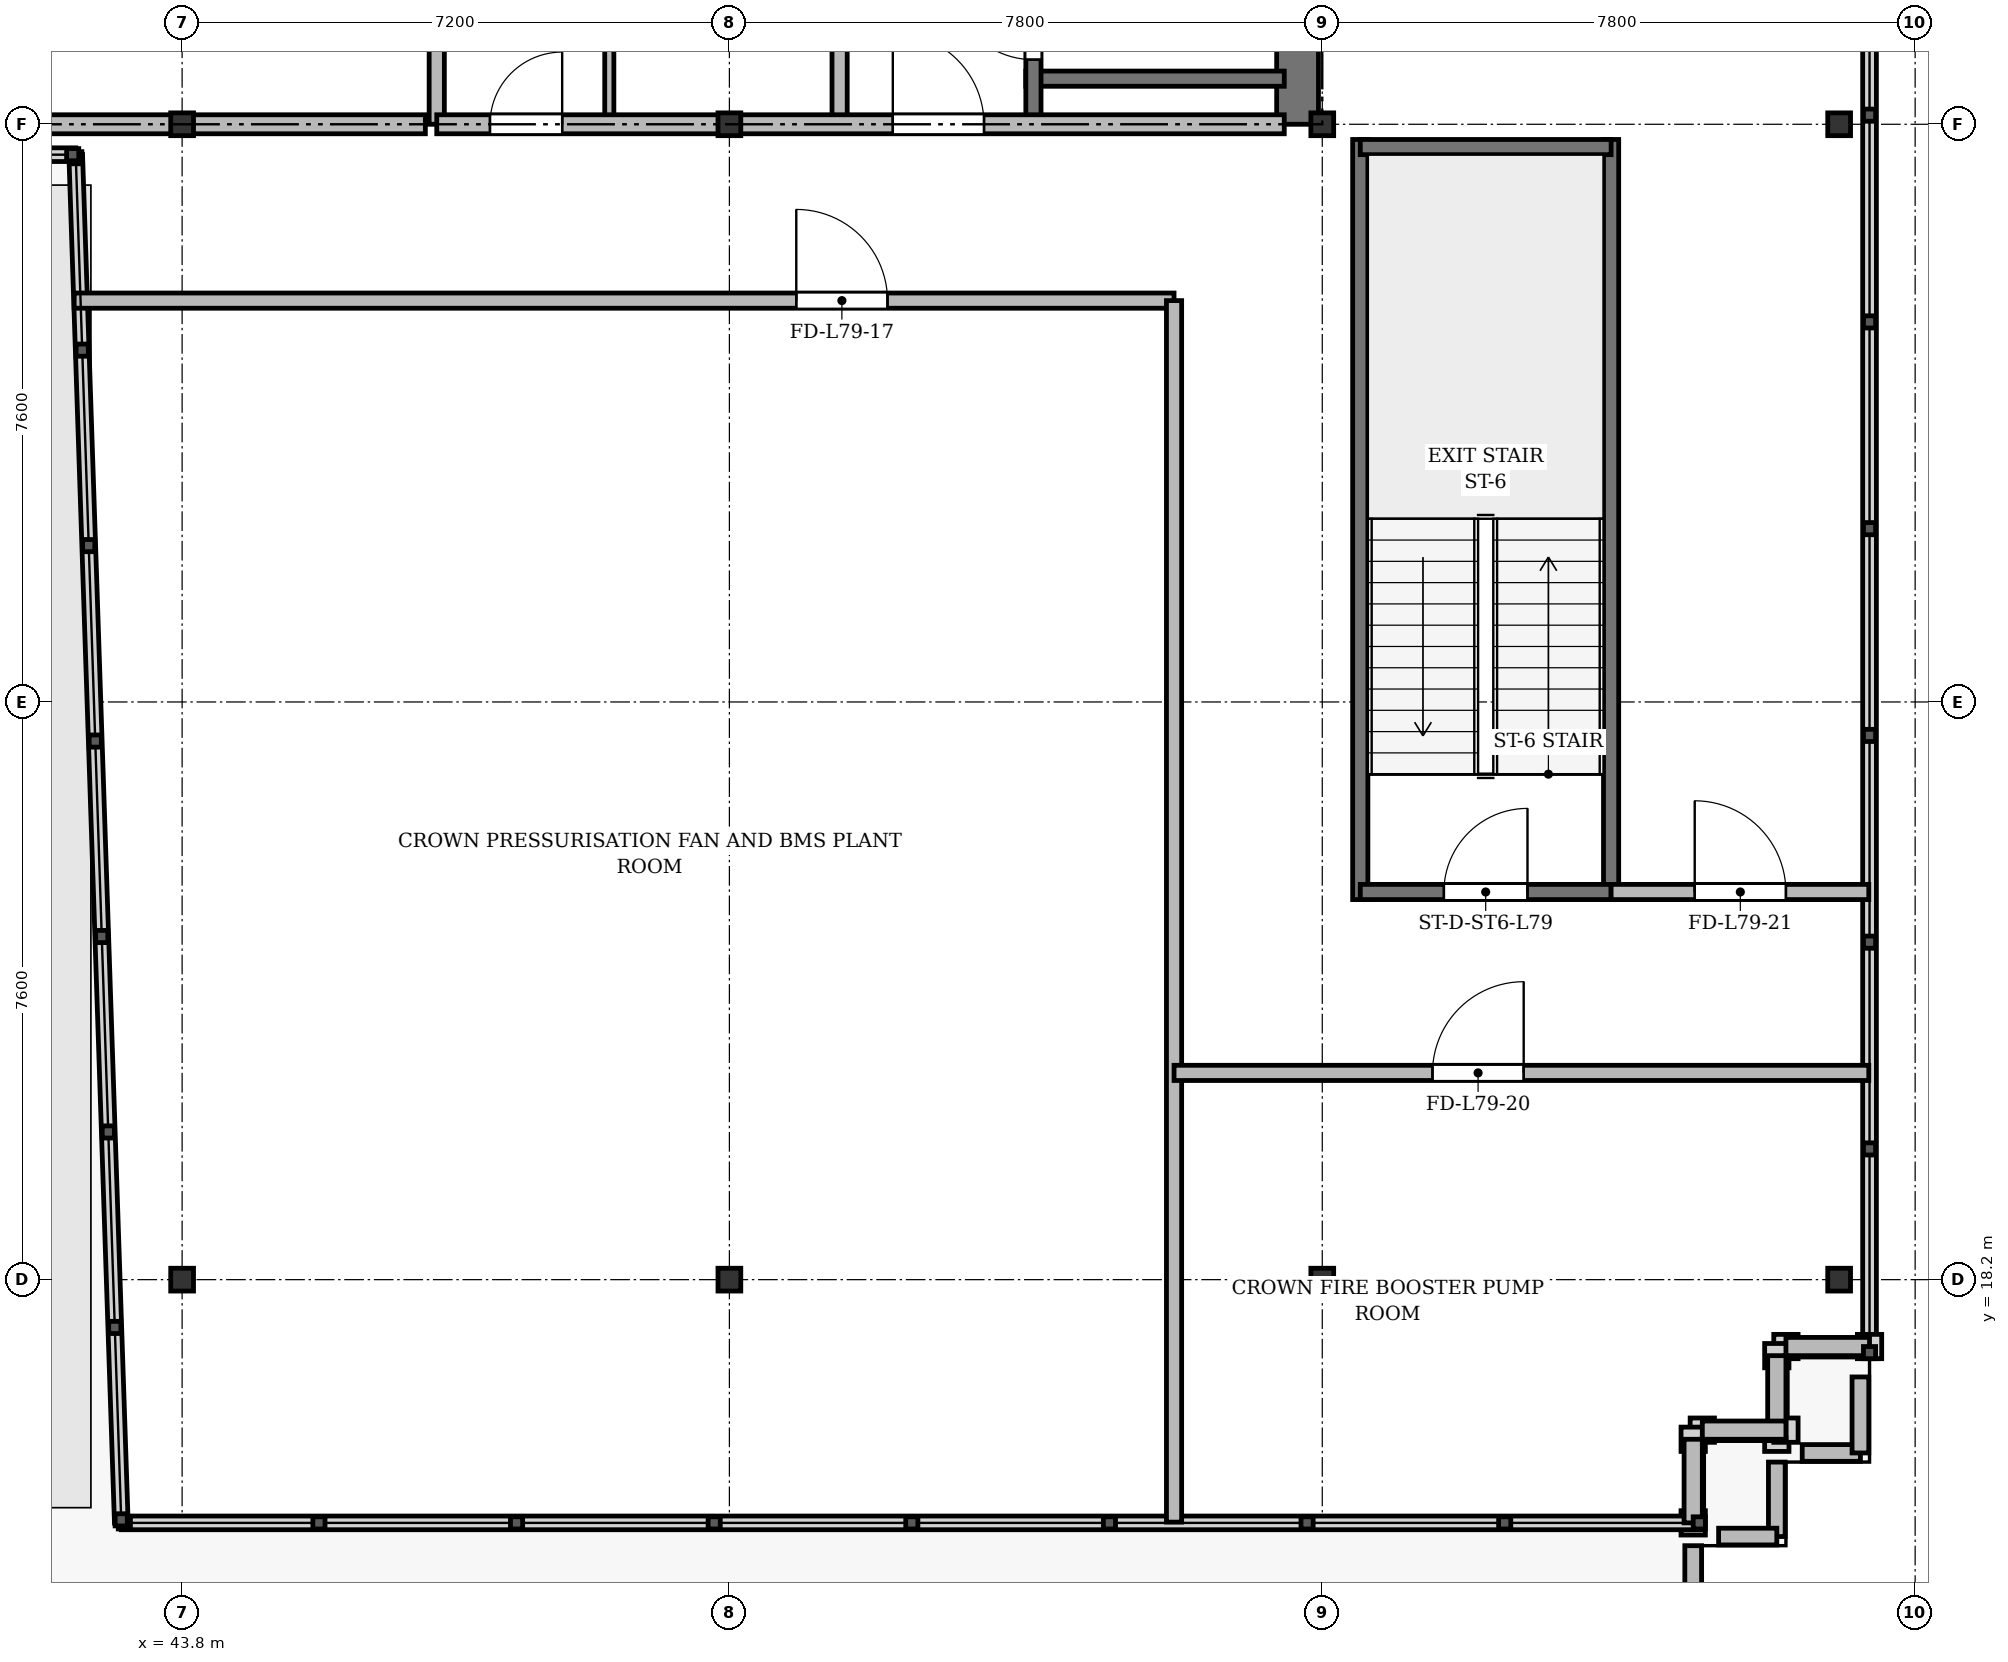
"""IFC4 building model, lengths in metres.
Left out: names, types, materials, properties, quantities, classifications, styles, units other than length and angle.
Written with IfcOpenShell. Run it as: python <this file> out.ifc"""

import sys

from ifc_helpers import new_model, si_unit, direction, frame, frame_2d, origin, origin_2d, place, context, subcontext, project, spatial, rectangle, i_section, extrude, source, transform, mapped, element, fill, save


model = new_model("IFC4")
c1 = context("Model", 3, precision=1e-05, world=origin(), true_north=direction((0.0, 1.0)))
c2 = subcontext(c1, "Body", "Model", "MODEL_VIEW")
j1 = project(units=[si_unit("LENGTHUNIT", "METRE"), si_unit("PLANEANGLEUNIT", "RADIAN")], contexts=[c1])
p1 = place(None, origin())
s1 = spatial("IfcSite", under=j1, at=p1, CompositionType="ELEMENT")
p2 = place(p1, origin())
s2 = spatial("IfcBuilding", under=s1, at=p2, CompositionType="ELEMENT")
p3 = place(p2, frame((0.0, 0.0, 303.5)))
s3 = spatial("IfcBuildingStorey", under=s2, at=p3, CompositionType="ELEMENT", Elevation=303.5)
m1 = source(origin(), c2, "Body", "SweptSolid", [
    extrude(i_section(OverallWidth=0.3, OverallDepth=0.3, WebThickness=0.015, FlangeThickness=0.024, at=origin_2d()), origin(), (0.0, 0.0, 1.0), 4.4),
])
for number, where, z_axis, x_axis in (
    (1, (43.8, 18.2, 0.0), (0.0, 0.0, 1.0), (1.0, 0.0, 0.0)),
    (2, (43.8, 33.4, 0.0), (0.0, 0.0, 1.0), (1.0, 0.0, 0.0)),
    (3, (51.0, 18.2, 0.0), (0.0, 0.0, 1.0), (1.0, 0.0, 0.0)),
    (4, (51.0, 33.4, 0.0), (0.0, 0.0, 1.0), (1.0, 0.0, 0.0)),
    (5, (58.8, 18.2, 0.0), (0.0, 0.0, 1.0), (1.0, 0.0, 0.0)),
    (6, (58.8, 33.4, 0.0), (0.0, 0.0, 1.0), (1.0, 0.0, 0.0)),
    (7, (65.6, 18.2, 0.0), (0.0, 0.0, 1.0), (1.0, 0.0, 0.0)),
    (8, (65.6, 33.4, 0.0), (0.0, 0.0, 1.0), (1.0, 0.0, 0.0)),
):
    element("IfcColumn", number, at=place(p3, frame(where, z_axis=z_axis, x_axis=x_axis)), inside=s3, PredefinedType="COLUMN", context=c2, shape_type="MappedRepresentation", body=[
        mapped(m1, transform((0.0, 0.0, 0.0), x_axis=(1.0, 0.0, 0.0), y_axis=(0.0, 1.0, 0.0), z_axis=(0.0, 0.0, 1.0), scale=1.0)),
    ])
p4 = place(p3, frame((66.0, 17.32, 0.0), z_axis=(0.0, 0.0, 1.0), x_axis=(-1.0, 0.0, 0.0)))
e9 = element("IfcWall", 9, at=p4, inside=s3, PredefinedType="SOLIDWALL", context=c2, shape_type="SweptSolid", body=[
    extrude(rectangle(XDim=1.1, YDim=0.24, at=frame_2d((0.55, 0.0))), origin(), (0.0, 0.0, 1.0), 4.1),
])
for number, where, z_axis, x_axis in (
    (10, (64.78, 17.2, 0.0), (0.0, 0.0, 1.0), (0.0, -1.0, 0.0)),
    (11, (64.9, 16.22, 0.0), (0.0, 0.0, 1.0), (-1.0, 0.0, 0.0)),
):
    element("IfcWall", number, at=place(p3, frame(where, z_axis=z_axis, x_axis=x_axis)), inside=s3, PredefinedType="SOLIDWALL", context=c2, shape_type="SweptSolid", body=[
        extrude(rectangle(XDim=1.1, YDim=0.24, at=frame_2d((0.55, 0.0))), origin(), (0.0, 0.0, 1.0), 4.1),
    ])
p5 = place(p3, frame((63.68, 16.1, 0.0), z_axis=(0.0, 0.0, 1.0), x_axis=(0.0, -1.0, 0.0)))
e12 = element("IfcWall", 12, at=p5, inside=s3, PredefinedType="SOLIDWALL", context=c2, shape_type="SweptSolid", body=[
    extrude(rectangle(XDim=1.1, YDim=0.24, at=frame_2d((0.55, 0.0))), origin(), (0.0, 0.0, 1.0), 4.1),
])
p6 = place(p3, frame((65.88, 15.92, 0.0), z_axis=(0.0, 0.0, 1.0), x_axis=(-1.0, 0.0, 0.0)))
e13 = element("IfcWall", 13, at=p6, inside=s3, PredefinedType="PARAPET", context=c2, shape_type="SweptSolid", body=[
    extrude(rectangle(XDim=0.766, YDim=0.22, at=frame_2d((0.383, 0.0))), origin(), (0.0, 0.0, 1.0), 1.08),
])
p7 = place(p3, frame((64.78, 15.8, 0.0), z_axis=(0.0, 0.0, 1.0), x_axis=(0.0, -1.0, 0.0)))
e14 = element("IfcWall", 14, at=p7, inside=s3, PredefinedType="PARAPET", context=c2, shape_type="SweptSolid", body=[
    extrude(rectangle(XDim=0.98, YDim=0.22, at=frame_2d((0.49, 0.0))), origin(), (0.0, 0.0, 1.0), 1.08),
])
p8 = place(p3, frame((64.78, 14.82, 0.0), z_axis=(0.0, 0.0, 1.0), x_axis=(-1.0, 0.0, 0.0)))
e15 = element("IfcWall", 15, at=p8, inside=s3, PredefinedType="PARAPET", context=c2, shape_type="SweptSolid", body=[
    extrude(rectangle(XDim=0.766, YDim=0.22, at=frame_2d((0.383, 0.0))), origin(), (0.0, 0.0, 1.0), 1.08),
])
p9 = place(p3, frame((63.68, 14.7, 0.0), z_axis=(0.0, 0.0, 1.0), x_axis=(0.0, -1.0, 0.0)))
e16 = element("IfcWall", 16, at=p9, inside=s3, PredefinedType="PARAPET", context=c2, shape_type="SweptSolid", body=[
    extrude(rectangle(XDim=0.98, YDim=0.22, at=frame_2d((0.49, 0.0))), origin(), (0.0, 0.0, 1.0), 1.08),
])
p10 = place(p3, frame((65.88, 16.92, 0.0), z_axis=(0.0, 0.0, 1.0), x_axis=(0.0, -1.0, 0.0)))
e17 = element("IfcWall", 17, at=p10, inside=s3, PredefinedType="PARAPET", context=c2, shape_type="SweptSolid", body=[
    extrude(rectangle(XDim=1.0, YDim=0.22, at=frame_2d((0.5, 0.0))), origin(), (0.0, 0.0, 1.0), 1.08),
])
p11 = place(p3, frame((58.475, 33.4, 0.0), z_axis=(0.0, 0.0, 1.0), x_axis=(0.0, 1.0, 0.0)))
e18 = element("IfcWall", 18, at=p11, inside=s3, PredefinedType="SHEAR", context=c2, shape_type="SweptSolid", body=[
    extrude(rectangle(XDim=11.55, YDim=0.55, at=frame_2d((5.775, 0.0))), origin(), (0.0, 0.0, 1.0), 4.1),
])
p12 = place(p3, frame((54.9, 34.0, 0.0), z_axis=(0.0, 0.0, 1.0), x_axis=(1.0, 0.0, 0.0)))
e19 = element("IfcWall", 19, at=p12, inside=s3, PredefinedType="SHEAR", context=c2, shape_type="SweptSolid", body=[
    extrude(rectangle(XDim=3.4, YDim=0.2, at=frame_2d((1.7, 0.0))), origin(), (0.0, 0.0, 1.0), 4.1),
])
p13 = place(p3, frame((55.0, 33.4, 0.0), z_axis=(0.0, 0.0, 1.0), x_axis=(0.0, 1.0, 0.0)))
e20 = element("IfcWall", 20, at=p13, inside=s3, PredefinedType="SHEAR", context=c2, shape_type="SweptSolid", body=[
    extrude(rectangle(XDim=11.1, YDim=0.2, at=frame_2d((5.55, 0.0))), origin(), (0.0, 0.0, 1.0), 4.1),
])
p14 = place(p13, frame((0.85, 0.0, 0.0)))
e21 = element("IfcOpeningElement", 21, at=p14, cuts=e20, PredefinedType="OPENING", context=c2, shape_type="SweptSolid", body=[
    extrude(rectangle(XDim=1.1, YDim=2.15, at=frame_2d((0.55, 1.075))), frame((0.0, 0.11, 0.0), z_axis=(0.0, -1.0, 0.0), x_axis=(1.0, 0.0, 0.0)), (0.0, 0.0, 1.0), 0.22),
])
for number, where, z_axis, x_axis in (
    (22, (59.3, 23.2, 0.0), (0.0, 0.0, 1.0), (0.0, 1.0, 0.0)),
    (23, (62.6, 23.2, 0.0), (0.0, 0.0, 1.0), (0.0, 1.0, 0.0)),
):
    element("IfcWall", number, at=place(p3, frame(where, z_axis=z_axis, x_axis=x_axis)), inside=s3, PredefinedType="SHEAR", context=c2, shape_type="SweptSolid", body=[
        extrude(rectangle(XDim=10.0, YDim=0.2, at=frame_2d((5.0, 0.0))), origin(), (0.0, 0.0, 1.0), 4.1),
    ])
p15 = place(p3, frame((59.3, 33.1, 0.0), z_axis=(0.0, 0.0, 1.0), x_axis=(1.0, 0.0, 0.0)))
e24 = element("IfcWall", 24, at=p15, inside=s3, PredefinedType="SHEAR", context=c2, shape_type="SweptSolid", body=[
    extrude(rectangle(XDim=3.3, YDim=0.2, at=frame_2d((1.65, 0.0))), origin(), (0.0, 0.0, 1.0), 4.1),
])
p16 = place(p3, frame((59.3, 23.3, 0.0), z_axis=(0.0, 0.0, 1.0), x_axis=(1.0, 0.0, 0.0)))
e25 = element("IfcWall", 25, at=p16, inside=s3, PredefinedType="SHEAR", context=c2, shape_type="SweptSolid", body=[
    extrude(rectangle(XDim=3.3, YDim=0.2, at=frame_2d((1.65, 0.0))), origin(), (0.0, 0.0, 1.0), 4.1),
])
p17 = place(p16, frame((1.1, 0.0, 0.0)))
e26 = element("IfcOpeningElement", 26, at=p17, cuts=e25, PredefinedType="OPENING", context=c2, shape_type="SweptSolid", body=[
    extrude(rectangle(XDim=1.1, YDim=2.15, at=frame_2d((0.55, 1.075))), frame((0.0, 0.11, 0.0), z_axis=(0.0, -1.0, 0.0), x_axis=(1.0, 0.0, 0.0)), (0.0, 0.0, 1.0), 0.22),
])
p18 = place(p3, frame((26.3, 33.4, 0.0), z_axis=(0.0, 0.0, 1.0), x_axis=(1.0, 0.0, 0.0)))
e27 = element("IfcWall", 27, at=p18, inside=s3, PredefinedType="PARTITIONING", context=c2, shape_type="SweptSolid", body=[
    extrude(rectangle(XDim=20.7, YDim=0.25, at=frame_2d((10.35, 0.0))), origin(), (0.0, 0.0, 1.0), 3.6),
])
p19 = place(p18, frame((2.0, 0.0, 0.0)))
e28 = element("IfcOpeningElement", 28, at=p19, cuts=e27, PredefinedType="OPENING", context=c2, shape_type="SweptSolid", body=[
    extrude(rectangle(XDim=1.6, YDim=2.2, at=frame_2d((0.8, 1.1))), frame((0.0, 0.135, 0.0), z_axis=(0.0, -1.0, 0.0), x_axis=(1.0, 0.0, 0.0)), (0.0, 0.0, 1.0), 0.27),
])
p20 = place(p3, frame((47.15, 33.4, 0.0), z_axis=(0.0, 0.0, 1.0), x_axis=(0.0, 1.0, 0.0)))
e29 = element("IfcWall", 29, at=p20, inside=s3, PredefinedType="SOLIDWALL", context=c2, shape_type="SweptSolid", body=[
    extrude(rectangle(XDim=11.3, YDim=0.2, at=frame_2d((5.65, 0.0))), origin(), (0.0, 0.0, 1.0), 3.6),
])
p21 = place(p3, frame((52.45, 33.4, 0.0), z_axis=(0.0, 0.0, 1.0), x_axis=(0.0, 1.0, 0.0)))
e30 = element("IfcWall", 30, at=p21, inside=s3, PredefinedType="PARTITIONING", context=c2, shape_type="SweptSolid", body=[
    extrude(rectangle(XDim=8.65, YDim=0.2, at=frame_2d((4.325, 0.0))), origin(), (0.0, 0.0, 1.0), 3.6),
])
p22 = place(p21, frame((6.2, 0.0, 0.0)))
e31 = element("IfcOpeningElement", 31, at=p22, cuts=e30, PredefinedType="OPENING", context=c2, shape_type="SweptSolid", body=[
    extrude(rectangle(XDim=0.95, YDim=2.15, at=frame_2d((0.475, 1.075))), frame((0.0, 0.11, 0.0), z_axis=(0.0, -1.0, 0.0), x_axis=(1.0, 0.0, 0.0)), (0.0, 0.0, 1.0), 0.22),
])
p23 = place(p3, frame((49.42, 33.4, 0.0), z_axis=(0.0, 0.0, 1.0), x_axis=(0.0, 1.0, 0.0)))
e32 = element("IfcWall", 32, at=p23, inside=s3, PredefinedType="PARTITIONING", context=c2, shape_type="SweptSolid", body=[
    extrude(rectangle(XDim=8.6, YDim=0.12, at=frame_2d((4.3, 0.0))), origin(), (0.0, 0.0, 1.0), 3.6),
])
p24 = place(p23, frame((1.3, 0.0, 0.0)))
e33 = element("IfcOpeningElement", 33, at=p24, cuts=e32, PredefinedType="OPENING", context=c2, shape_type="SweptSolid", body=[
    extrude(rectangle(XDim=0.95, YDim=2.15, at=frame_2d((0.475, 1.075))), frame((0.0, 0.07, 0.0), z_axis=(0.0, -1.0, 0.0), x_axis=(1.0, 0.0, 0.0)), (0.0, 0.0, 1.0), 0.14),
])
p25 = place(p23, frame((5.5, 0.0, 0.0)))
e34 = element("IfcOpeningElement", 34, at=p25, cuts=e32, PredefinedType="OPENING", context=c2, shape_type="SweptSolid", body=[
    extrude(rectangle(XDim=0.95, YDim=2.15, at=frame_2d((0.475, 1.075))), frame((0.0, 0.07, 0.0), z_axis=(0.0, -1.0, 0.0), x_axis=(1.0, 0.0, 0.0)), (0.0, 0.0, 1.0), 0.14),
])
p26 = place(p3, frame((47.15, 33.4, 0.0), z_axis=(0.0, 0.0, 1.0), x_axis=(1.0, 0.0, 0.0)))
e35 = element("IfcWall", 35, at=p26, inside=s3, PredefinedType="PARTITIONING", context=c2, shape_type="SweptSolid", body=[
    extrude(rectangle(XDim=11.15, YDim=0.25, at=frame_2d((5.575, 0.0))), origin(), (0.0, 0.0, 1.0), 3.6),
])
p27 = place(p26, frame((0.7, 0.0, 0.0)))
e36 = element("IfcOpeningElement", 36, at=p27, cuts=e35, PredefinedType="OPENING", context=c2, shape_type="SweptSolid", body=[
    extrude(rectangle(XDim=0.95, YDim=2.15, at=frame_2d((0.475, 1.075))), frame((0.0, 0.135, 0.0), z_axis=(0.0, -1.0, 0.0), x_axis=(1.0, 0.0, 0.0)), (0.0, 0.0, 1.0), 0.27),
])
p28 = place(p26, frame((6.0, 0.0, 0.0)))
e37 = element("IfcOpeningElement", 37, at=p28, cuts=e35, PredefinedType="OPENING", context=c2, shape_type="SweptSolid", body=[
    extrude(rectangle(XDim=1.2, YDim=2.15, at=frame_2d((0.6, 1.075))), frame((0.0, 0.135, 0.0), z_axis=(0.0, -1.0, 0.0), x_axis=(1.0, 0.0, 0.0)), (0.0, 0.0, 1.0), 0.27),
])
p29 = place(p3, frame((42.38, 31.08, 0.0), z_axis=(0.0, 0.0, 1.0), x_axis=(1.0, 0.0, 0.0)))
e38 = element("IfcWall", 38, at=p29, inside=s3, PredefinedType="PARTITIONING", context=c2, shape_type="SweptSolid", body=[
    extrude(rectangle(XDim=14.47, YDim=0.2, at=frame_2d((7.235, 0.0))), origin(), (0.0, 0.0, 1.0), 3.6),
])
p30 = place(p29, frame((9.5, 0.0, 0.0)))
e39 = element("IfcOpeningElement", 39, at=p30, cuts=e38, PredefinedType="OPENING", context=c2, shape_type="SweptSolid", body=[
    extrude(rectangle(XDim=1.2, YDim=2.15, at=frame_2d((0.6, 1.075))), frame((0.0, 0.11, 0.0), z_axis=(0.0, -1.0, 0.0), x_axis=(1.0, 0.0, 0.0)), (0.0, 0.0, 1.0), 0.22),
])
p31 = place(p3, frame((56.85, 15.01, 0.0), z_axis=(0.0, 0.0, 1.0), x_axis=(0.0, 1.0, 0.0)))
e40 = element("IfcWall", 40, at=p31, inside=s3, PredefinedType="PARTITIONING", context=c2, shape_type="SweptSolid", body=[
    extrude(rectangle(XDim=16.07, YDim=0.2, at=frame_2d((8.035, 0.0))), origin(), (0.0, 0.0, 1.0), 3.6),
])
p32 = place(p3, frame((56.85, 20.92, 0.0), z_axis=(0.0, 0.0, 1.0), x_axis=(1.0, 0.0, 0.0)))
e41 = element("IfcWall", 41, at=p32, inside=s3, PredefinedType="PARTITIONING", context=c2, shape_type="SweptSolid", body=[
    extrude(rectangle(XDim=9.14, YDim=0.2, at=frame_2d((4.57, 0.0))), origin(), (0.0, 0.0, 1.0), 3.6),
])
p33 = place(p32, frame((3.4, 0.0, 0.0)))
e42 = element("IfcOpeningElement", 42, at=p33, cuts=e41, PredefinedType="OPENING", context=c2, shape_type="SweptSolid", body=[
    extrude(rectangle(XDim=1.2, YDim=2.15, at=frame_2d((0.6, 1.075))), frame((0.0, 0.11, 0.0), z_axis=(0.0, -1.0, 0.0), x_axis=(1.0, 0.0, 0.0)), (0.0, 0.0, 1.0), 0.22),
])
p34 = place(p3, frame((62.6, 23.3, 0.0), z_axis=(0.0, 0.0, 1.0), x_axis=(1.0, 0.0, 0.0)))
e43 = element("IfcWall", 43, at=p34, inside=s3, PredefinedType="PARTITIONING", context=c2, shape_type="SweptSolid", body=[
    extrude(rectangle(XDim=3.39, YDim=0.2, at=frame_2d((1.695, 0.0))), origin(), (0.0, 0.0, 1.0), 3.6),
])
p35 = place(p34, frame((1.1, 0.0, 0.0)))
e44 = element("IfcOpeningElement", 44, at=p35, cuts=e43, PredefinedType="OPENING", context=c2, shape_type="SweptSolid", body=[
    extrude(rectangle(XDim=1.2, YDim=2.15, at=frame_2d((0.6, 1.075))), frame((0.0, 0.11, 0.0), z_axis=(0.0, -1.0, 0.0), x_axis=(1.0, 0.0, 0.0)), (0.0, 0.0, 1.0), 0.22),
])
m2 = source(origin(), c2, "Body", "SweptSolid", [
    extrude(rectangle(XDim=1.1, YDim=2.15, at=frame_2d((0.55, 1.075))), frame((0.0, 0.025, 0.0), z_axis=(0.0, -1.0, 0.0), x_axis=(1.0, 0.0, 0.0)), (0.0, 0.0, 1.0), 0.05),
])
p36 = place(p14, origin())
e45 = element("IfcDoor", 45, at=p36, inside=s3, OperationType="SINGLE_SWING_RIGHT", PredefinedType="DOOR", context=c2, shape_type="MappedRepresentation", body=[
    mapped(m2, transform((0.0, 0.0, 0.0), x_axis=(1.0, 0.0, 0.0), y_axis=(0.0, 1.0, 0.0), z_axis=(0.0, 0.0, 1.0), scale=1.0)),
])
fill(e21, e45)
p37 = place(p17, origin())
e46 = element("IfcDoor", 46, at=p37, inside=s3, OperationType="SINGLE_SWING_RIGHT", PredefinedType="DOOR", context=c2, shape_type="MappedRepresentation", body=[
    mapped(m2, transform((0.0, 0.0, 0.0), x_axis=(1.0, 0.0, 0.0), y_axis=(0.0, 1.0, 0.0), z_axis=(0.0, 0.0, 1.0), scale=1.0)),
])
fill(e26, e46)
m3 = source(origin(), c2, "Body", "SweptSolid", [
    extrude(rectangle(XDim=0.95, YDim=2.15, at=frame_2d((0.475, 1.075))), frame((0.0, 0.025, 0.0), z_axis=(0.0, -1.0, 0.0), x_axis=(1.0, 0.0, 0.0)), (0.0, 0.0, 1.0), 0.05),
])
p38 = place(p27, origin())
e47 = element("IfcDoor", 47, at=p38, inside=s3, OperationType="SINGLE_SWING_RIGHT", PredefinedType="DOOR", context=c2, shape_type="MappedRepresentation", body=[
    mapped(m3, transform((0.0, 0.0, 0.0), x_axis=(1.0, 0.0, 0.0), y_axis=(0.0, 1.0, 0.0), z_axis=(0.0, 0.0, 1.0), scale=1.0)),
])
fill(e36, e47)
m4 = source(origin(), c2, "Body", "SweptSolid", [
    extrude(rectangle(XDim=1.2, YDim=2.15, at=frame_2d((0.6, 1.075))), frame((0.0, 0.025, 0.0), z_axis=(0.0, -1.0, 0.0), x_axis=(1.0, 0.0, 0.0)), (0.0, 0.0, 1.0), 0.05),
])
p39 = place(p28, origin())
e48 = element("IfcDoor", 48, at=p39, inside=s3, OperationType="SINGLE_SWING_LEFT", PredefinedType="DOOR", context=c2, shape_type="MappedRepresentation", body=[
    mapped(m4, transform((0.0, 0.0, 0.0), x_axis=(1.0, 0.0, 0.0), y_axis=(0.0, 1.0, 0.0), z_axis=(0.0, 0.0, 1.0), scale=1.0)),
])
fill(e37, e48)
p40 = place(p30, origin())
e49 = element("IfcDoor", 49, at=p40, inside=s3, OperationType="SINGLE_SWING_LEFT", PredefinedType="DOOR", context=c2, shape_type="MappedRepresentation", body=[
    mapped(m4, transform((0.0, 0.0, 0.0), x_axis=(1.0, 0.0, 0.0), y_axis=(0.0, 1.0, 0.0), z_axis=(0.0, 0.0, 1.0), scale=1.0)),
])
fill(e39, e49)
p41 = place(p33, origin())
e50 = element("IfcDoor", 50, at=p41, inside=s3, OperationType="SINGLE_SWING_RIGHT", PredefinedType="DOOR", context=c2, shape_type="MappedRepresentation", body=[
    mapped(m4, transform((0.0, 0.0, 0.0), x_axis=(1.0, 0.0, 0.0), y_axis=(0.0, 1.0, 0.0), z_axis=(0.0, 0.0, 1.0), scale=1.0)),
])
fill(e42, e50)
p42 = place(p35, origin())
e51 = element("IfcDoor", 51, at=p42, inside=s3, OperationType="SINGLE_SWING_LEFT", PredefinedType="DOOR", context=c2, shape_type="MappedRepresentation", body=[
    mapped(m4, transform((0.0, 0.0, 0.0), x_axis=(1.0, 0.0, 0.0), y_axis=(0.0, 1.0, 0.0), z_axis=(0.0, 0.0, 1.0), scale=1.0)),
])
fill(e44, e51)
save(model, sys.argv[1])
